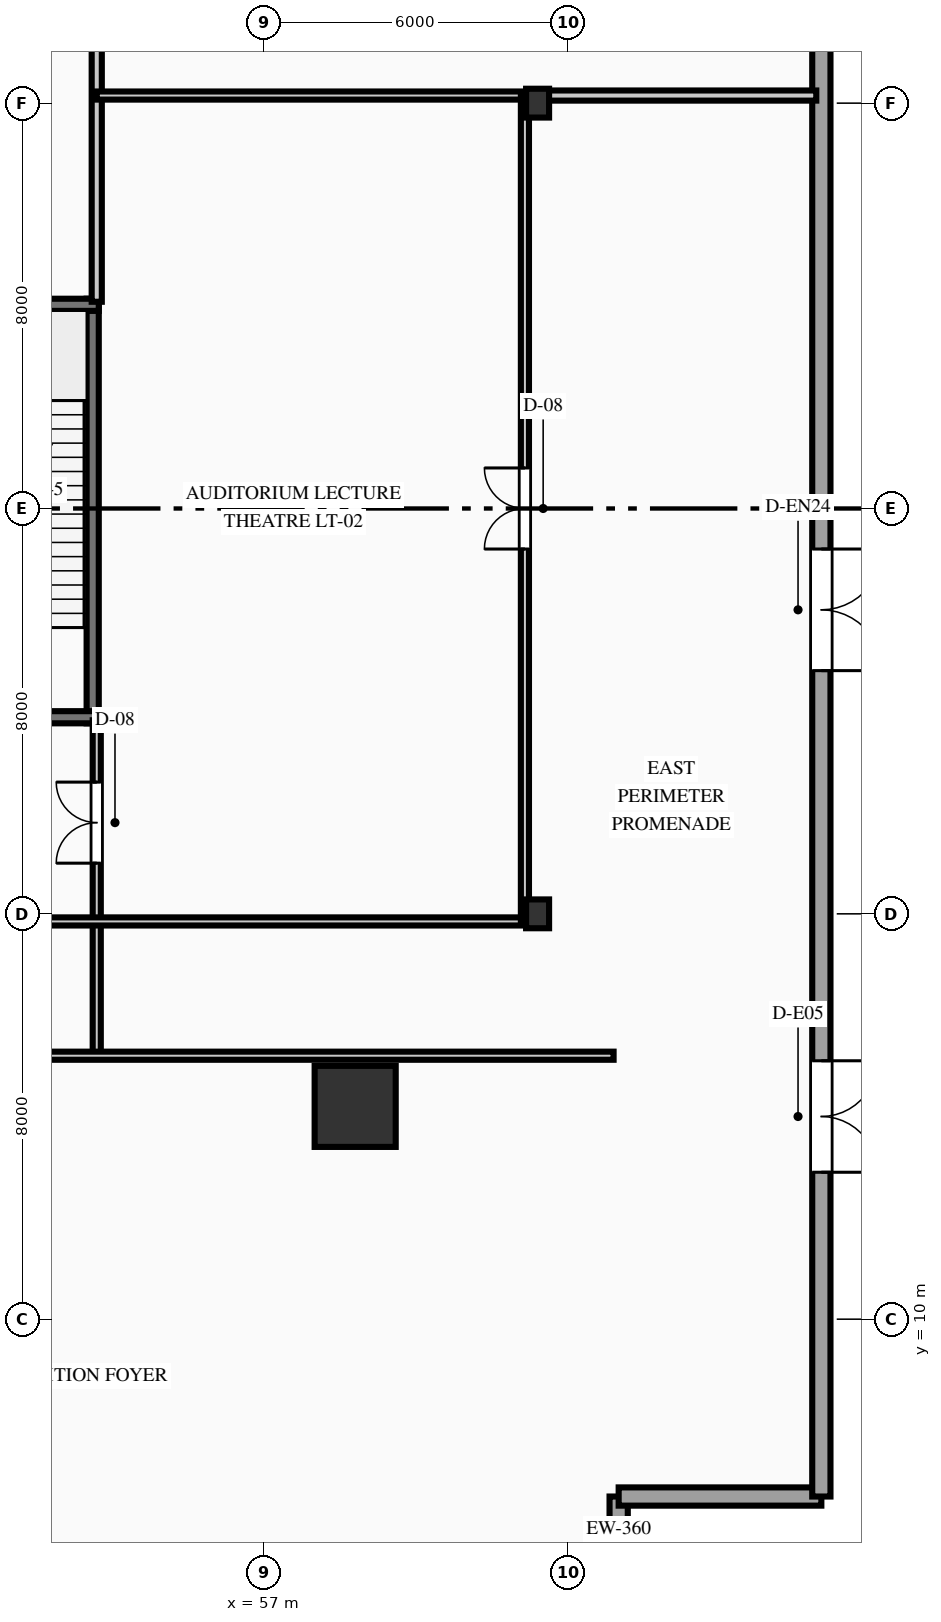
"""IFC4 building model, lengths in metres.
Left out: names, types, materials, properties, quantities, classifications, styles, units other than length and angle.
Written with IfcOpenShell. Run it as: python <this file> out.ifc"""

import sys

from ifc_helpers import new_model, si_unit, direction, frame, frame_2d, origin, origin_2d, place, context, subcontext, project, spatial, rectangle, hollow_rectangle, i_section, extrude, element, fill, save


model = new_model("IFC4")
c1 = context("Model", 3, precision=1e-05, world=origin(), true_north=direction((0.0, 1.0)))
c2 = subcontext(c1, "Body", "Model", "MODEL_VIEW")
j1 = project(units=[si_unit("LENGTHUNIT", "METRE"), si_unit("PLANEANGLEUNIT", "RADIAN")], contexts=[c1])
p1 = place(None, origin())
s1 = spatial("IfcSite", under=j1, at=p1, CompositionType="ELEMENT")
p2 = place(p1, origin())
s2 = spatial("IfcBuilding", under=s1, at=p2, CompositionType="ELEMENT")
p3 = place(p2, origin())
s3 = spatial("IfcBuildingStorey", under=s2, at=p3, CompositionType="ELEMENT", Elevation=0.0)
p4 = place(p3, frame((53.62, 21.76, 0.0), z_axis=(0.0, 0.0, 1.0), x_axis=(0.0, 1.0, 0.0)))
e1 = element("IfcWall", 1, at=p4, inside=s3, PredefinedType="SHEAR", context=c2, shape_type="SweptSolid", body=[
    extrude(rectangle(XDim=8.38, YDim=0.24, at=frame_2d((4.19, 0.0))), origin(), (0.0, 0.0, 1.0), 6.0),
])
p5 = place(p3, frame((49.76, 21.88, 0.0), z_axis=(0.0, 0.0, 1.0), x_axis=(1.0, 0.0, 0.0)))
e2 = element("IfcWall", 2, at=p5, inside=s3, PredefinedType="SHEAR", context=c2, shape_type="SweptSolid", body=[
    extrude(rectangle(XDim=3.98, YDim=0.24, at=frame_2d((1.99, 0.0))), origin(), (0.0, 0.0, 1.0), 6.0),
])
p6 = place(p5, frame((1.465, 0.0, 0.0)))
e3 = element("IfcOpeningElement", 3, at=p6, cuts=e2, PredefinedType="OPENING", context=c2, shape_type="SweptSolid", body=[
    extrude(rectangle(XDim=1.05, YDim=2.15, at=frame_2d((0.525, 1.075))), frame((0.0, 0.13, 0.0), z_axis=(0.0, -1.0, 0.0), x_axis=(1.0, 0.0, 0.0)), (0.0, 0.0, 1.0), 0.26),
])
p7 = place(p3, frame((49.76, 30.02, 0.0), z_axis=(0.0, 0.0, 1.0), x_axis=(1.0, 0.0, 0.0)))
e4 = element("IfcWall", 4, at=p7, inside=s3, PredefinedType="SHEAR", context=c2, shape_type="SweptSolid", body=[
    extrude(rectangle(XDim=3.98, YDim=0.24, at=frame_2d((1.99, 0.0))), origin(), (0.0, 0.0, 1.0), 6.0),
])
p8 = place(p3, frame((58.8, 14.2, 0.0), z_axis=(0.0, 0.0, 1.0), x_axis=(1.0, 0.0, 0.0)))
e5 = element("IfcColumn", 5, at=p8, inside=s3, PredefinedType="COLUMN", context=c2, shape_type="SweptSolid", body=[
    extrude(hollow_rectangle(XDim=1.6, YDim=1.6, WallThickness=0.08, at=origin_2d()), origin(), (0.0, 0.0, 1.0), 6.0),
])
for number, where, z_axis, x_axis in (
    (6, (62.4, 18.0, 0.0), (0.0, 0.0, 1.0), (1.0, 0.0, 0.0)),
    (7, (62.4, 34.0, 0.0), (0.0, 0.0, 1.0), (1.0, 0.0, 0.0)),
):
    element("IfcColumn", number, at=place(p3, frame(where, z_axis=z_axis, x_axis=x_axis)), inside=s3, PredefinedType="COLUMN", context=c2, shape_type="SweptSolid", body=[
        extrude(i_section(OverallWidth=0.454, OverallDepth=0.569, WebThickness=0.078, FlangeThickness=0.125, at=origin_2d()), origin(), (0.0, 0.0, 1.0), 6.0),
    ])
for number, where, z_axis, x_axis in (
    (8, (64.0, 6.5, 0.0), (0.0, 0.0, 1.0), (0.0, -1.0, 0.0)),
    (9, (68.0, 6.5, 0.0), (0.0, 0.0, 1.0), (-1.0, 0.0, 0.0)),
):
    element("IfcWall", number, at=place(p3, frame(where, z_axis=z_axis, x_axis=x_axis)), inside=s3, PredefinedType="STANDARD", context=c2, shape_type="SweptSolid", body=[
        extrude(rectangle(XDim=4.0, YDim=0.36, at=frame_2d((2.0, 0.0))), origin(), (0.0, 0.0, 1.0), 5.67),
    ])
p9 = place(p3, frame((68.0, 45.5, 0.0), z_axis=(0.0, 0.0, 1.0), x_axis=(0.0, -1.0, 0.0)))
e10 = element("IfcWall", 10, at=p9, inside=s3, PredefinedType="STANDARD", context=c2, shape_type="SweptSolid", body=[
    extrude(rectangle(XDim=39.0, YDim=0.36, at=frame_2d((19.5, 0.0))), origin(), (0.0, 0.0, 1.0), 5.67),
])
p10 = place(p9, frame((30.4, 0.0, 0.0)))
e11 = element("IfcOpeningElement", 11, at=p10, cuts=e10, PredefinedType="OPENING", context=c2, shape_type="SweptSolid", body=[
    extrude(rectangle(XDim=2.2, YDim=2.4, at=frame_2d((1.1, 1.2))), frame((0.0, 0.19, 0.0), z_axis=(0.0, -1.0, 0.0), x_axis=(1.0, 0.0, 0.0)), (0.0, 0.0, 1.0), 0.38),
])
p11 = place(p9, frame((20.3, 0.0, 0.0)))
e12 = element("IfcOpeningElement", 12, at=p11, cuts=e10, PredefinedType="OPENING", context=c2, shape_type="SweptSolid", body=[
    extrude(rectangle(XDim=2.4, YDim=2.6, at=frame_2d((1.2, 1.3))), frame((0.0, 0.19, 0.0), z_axis=(0.0, -1.0, 0.0), x_axis=(1.0, 0.0, 0.0)), (0.0, 0.0, 1.0), 0.38),
])
p12 = place(p9, frame((5.0, 0.0, 0.0)))
e13 = element("IfcOpeningElement", 13, at=p12, cuts=e10, PredefinedType="OPENING", context=c2, shape_type="SweptSolid", body=[
    extrude(rectangle(XDim=3.6, YDim=3.8, at=frame_2d((1.8, 1.9))), frame((0.0, 0.19, 0.0), z_axis=(0.0, -1.0, 0.0), x_axis=(1.0, 0.0, 0.0)), (0.0, 0.0, 1.0), 0.38),
])
p13 = place(p3, frame((53.7, 30.08, 0.0), z_axis=(0.0, 0.0, 1.0), x_axis=(0.0, 1.0, 0.0)))
e14 = element("IfcWall", 14, at=p13, inside=s3, PredefinedType="PARTITIONING", context=c2, shape_type="SweptSolid", body=[
    extrude(rectangle(XDim=19.37, YDim=0.2, at=frame_2d((9.685, 0.0))), origin(), (0.0, 0.0, 1.0), 5.67),
])
p14 = place(p13, frame((15.595, 0.0, 0.0)))
e15 = element("IfcOpeningElement", 15, at=p14, cuts=e14, PredefinedType="OPENING", context=c2, shape_type="SweptSolid", body=[
    extrude(rectangle(XDim=1.05, YDim=2.15, at=frame_2d((0.525, 1.075))), frame((0.0, 0.11, 0.0), z_axis=(0.0, -1.0, 0.0), x_axis=(1.0, 0.0, 0.0)), (0.0, 0.0, 1.0), 0.22),
])
p15 = place(p13, frame((7.72, 0.0, 0.0)))
e16 = element("IfcOpeningElement", 16, at=p15, cuts=e14, PredefinedType="OPENING", context=c2, shape_type="SweptSolid", body=[
    extrude(rectangle(XDim=1.4, YDim=2.2, at=frame_2d((0.7, 1.1))), frame((0.0, 0.11, 0.0), z_axis=(0.0, -1.0, 0.0), x_axis=(1.0, 0.0, 0.0)), (0.0, 0.0, 1.0), 0.22),
])
p16 = place(p3, frame((53.7, 15.2, 0.0), z_axis=(0.0, 0.0, 1.0), x_axis=(0.0, 1.0, 0.0)))
e17 = element("IfcWall", 17, at=p16, inside=s3, PredefinedType="PARTITIONING", context=c2, shape_type="SweptSolid", body=[
    extrude(rectangle(XDim=2.65, YDim=0.16, at=frame_2d((1.325, 0.0))), origin(), (0.0, 0.0, 1.0), 5.67),
])
p17 = place(p3, frame((53.7, 17.85, 0.0), z_axis=(0.0, 0.0, 1.0), x_axis=(0.0, 1.0, 0.0)))
e18 = element("IfcWall", 18, at=p17, inside=s3, PredefinedType="PARTITIONING", context=c2, shape_type="SweptSolid", body=[
    extrude(rectangle(XDim=3.97, YDim=0.16, at=frame_2d((1.985, 0.0))), origin(), (0.0, 0.0, 1.0), 5.67),
])
p18 = place(p17, frame((1.15, 0.0, 0.0)))
e19 = element("IfcOpeningElement", 19, at=p18, cuts=e18, PredefinedType="OPENING", context=c2, shape_type="SweptSolid", body=[
    extrude(rectangle(XDim=1.6, YDim=2.2, at=frame_2d((0.8, 1.1))), frame((0.0, 0.09, 0.0), z_axis=(0.0, -1.0, 0.0), x_axis=(1.0, 0.0, 0.0)), (0.0, 0.0, 1.0), 0.18),
])
p19 = place(p3, frame((49.8, 17.85, 0.0), z_axis=(0.0, 0.0, 1.0), x_axis=(1.0, 0.0, 0.0)))
e20 = element("IfcWall", 20, at=p19, inside=s3, PredefinedType="PARTITIONING", context=c2, shape_type="SweptSolid", body=[
    extrude(rectangle(XDim=12.35, YDim=0.16, at=frame_2d((6.175, 0.0))), origin(), (0.0, 0.0, 1.0), 4.803),
])
p20 = place(p19, frame((1.425, 0.0, 0.0)))
e21 = element("IfcOpeningElement", 21, at=p20, cuts=e20, PredefinedType="OPENING", context=c2, shape_type="SweptSolid", body=[
    extrude(rectangle(XDim=1.05, YDim=2.15, at=frame_2d((0.525, 1.075))), frame((0.0, 0.09, 0.0), z_axis=(0.0, -1.0, 0.0), x_axis=(1.0, 0.0, 0.0)), (0.0, 0.0, 1.0), 0.18),
])
p21 = place(p3, frame((53.7, 34.15, 0.0), z_axis=(0.0, 0.0, 1.0), x_axis=(1.0, 0.0, 0.0)))
e22 = element("IfcWall", 22, at=p21, inside=s3, PredefinedType="PARTITIONING", context=c2, shape_type="SweptSolid", body=[
    extrude(rectangle(XDim=8.45, YDim=0.16, at=frame_2d((4.225, 0.0))), origin(), (0.0, 0.0, 1.0), 4.803),
])
p22 = place(p3, frame((62.15, 17.85, 0.0), z_axis=(0.0, 0.0, 1.0), x_axis=(0.0, 1.0, 0.0)))
e23 = element("IfcWall", 23, at=p22, inside=s3, PredefinedType="PARTITIONING", context=c2, shape_type="SweptSolid", body=[
    extrude(rectangle(XDim=16.3, YDim=0.16, at=frame_2d((8.15, 0.0))), origin(), (0.0, 0.0, 1.0), 4.803),
])
p23 = place(p22, frame((7.35, 0.0, 0.0)))
e24 = element("IfcOpeningElement", 24, at=p23, cuts=e23, PredefinedType="OPENING", context=c2, shape_type="SweptSolid", body=[
    extrude(rectangle(XDim=1.6, YDim=2.2, at=frame_2d((0.8, 1.1))), frame((0.0, 0.09, 0.0), z_axis=(0.0, -1.0, 0.0), x_axis=(1.0, 0.0, 0.0)), (0.0, 0.0, 1.0), 0.18),
])
p24 = place(p3, frame((41.6, 15.2, 0.0), z_axis=(0.0, 0.0, 1.0), x_axis=(1.0, 0.0, 0.0)))
e25 = element("IfcWall", 25, at=p24, inside=s3, PredefinedType="PARTITIONING", context=c2, shape_type="SweptSolid", body=[
    extrude(rectangle(XDim=22.3, YDim=0.16, at=frame_2d((11.15, 0.0))), origin(), (0.0, 0.0, 1.0), 4.803),
])
p25 = place(p24, frame((4.1, 0.0, 0.0)))
e26 = element("IfcOpeningElement", 26, at=p25, cuts=e25, PredefinedType="OPENING", context=c2, shape_type="SweptSolid", body=[
    extrude(rectangle(XDim=1.6, YDim=2.2, at=frame_2d((0.8, 1.1))), frame((0.0, 0.09, 0.0), z_axis=(0.0, -1.0, 0.0), x_axis=(1.0, 0.0, 0.0)), (0.0, 0.0, 1.0), 0.18),
])
p26 = place(p3, frame((62.25, 34.15, 0.0), z_axis=(0.0, 0.0, 1.0), x_axis=(1.0, 0.0, 0.0)))
e27 = element("IfcWall", 27, at=p26, inside=s3, PredefinedType="PARTITIONING", context=c2, shape_type="SweptSolid", body=[
    extrude(rectangle(XDim=5.65, YDim=0.2, at=frame_2d((2.825, 0.0))), origin(), (0.0, 0.0, 1.0), 4.803),
])
p27 = place(p10, origin())
e28 = element("IfcDoor", 28, at=p27, inside=s3, OperationType="DOUBLE_DOOR_SINGLE_SWING", PredefinedType="DOOR", context=c2, shape_type="SweptSolid", body=[
    extrude(rectangle(XDim=2.2, YDim=2.4, at=frame_2d((1.1, 1.2))), frame((0.0, 0.025, 0.0), z_axis=(0.0, -1.0, 0.0), x_axis=(1.0, 0.0, 0.0)), (0.0, 0.0, 1.0), 0.05),
])
fill(e11, e28)
p28 = place(p11, origin())
e29 = element("IfcDoor", 29, at=p28, inside=s3, OperationType="DOUBLE_DOOR_SINGLE_SWING", PredefinedType="DOOR", context=c2, shape_type="SweptSolid", body=[
    extrude(rectangle(XDim=2.4, YDim=2.6, at=frame_2d((1.2, 1.3))), frame((0.0, 0.025, 0.0), z_axis=(0.0, -1.0, 0.0), x_axis=(1.0, 0.0, 0.0)), (0.0, 0.0, 1.0), 0.05),
])
fill(e12, e29)
p29 = place(p18, origin())
e30 = element("IfcDoor", 30, at=p29, inside=s3, OperationType="DOUBLE_DOOR_SINGLE_SWING", PredefinedType="DOOR", context=c2, shape_type="SweptSolid", body=[
    extrude(rectangle(XDim=1.6, YDim=2.2, at=frame_2d((0.8, 1.1))), frame((0.0, 0.025, 0.0), z_axis=(0.0, -1.0, 0.0), x_axis=(1.0, 0.0, 0.0)), (0.0, 0.0, 1.0), 0.05),
])
fill(e19, e30)
p30 = place(p23, origin())
e31 = element("IfcDoor", 31, at=p30, inside=s3, OperationType="DOUBLE_DOOR_SINGLE_SWING", PredefinedType="DOOR", context=c2, shape_type="SweptSolid", body=[
    extrude(rectangle(XDim=1.6, YDim=2.2, at=frame_2d((0.8, 1.1))), frame((0.0, 0.025, 0.0), z_axis=(0.0, -1.0, 0.0), x_axis=(1.0, 0.0, 0.0)), (0.0, 0.0, 1.0), 0.05),
])
fill(e24, e31)
save(model, sys.argv[1])
